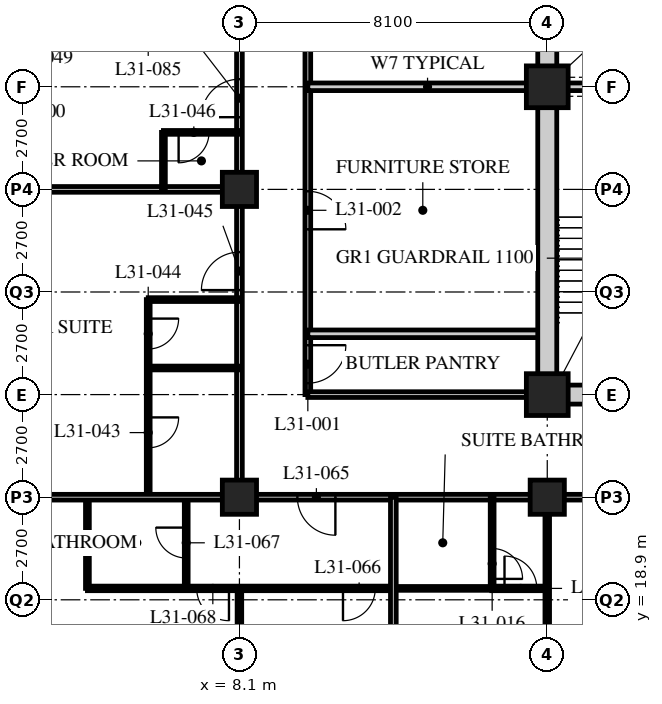
"""IFC4 building model, lengths in metres.
Left out: names, types, materials, properties, quantities, classifications, styles, units other than length and angle.
Written with IfcOpenShell. Run it as: python <this file> out.ifc"""

import sys

from ifc_helpers import new_model, si_unit, direction, frame, frame_2d, origin, origin_2d, place, context, subcontext, project, spatial, rectangle, hollow_rectangle, extrude, element, fill, save


model = new_model("IFC4")
c1 = context("Model", 3, precision=1e-05, world=origin(), true_north=direction((0.0, 1.0)))
c2 = subcontext(c1, "Body", "Model", "MODEL_VIEW")
j1 = project(units=[si_unit("LENGTHUNIT", "METRE"), si_unit("PLANEANGLEUNIT", "RADIAN")], contexts=[c1])
p1 = place(None, origin())
s1 = spatial("IfcSite", under=j1, at=p1, CompositionType="ELEMENT")
p2 = place(p1, origin())
s2 = spatial("IfcBuilding", under=s1, at=p2, CompositionType="ELEMENT")
p3 = place(p2, frame((0.0, 0.0, 123.8)))
s3 = spatial("IfcBuildingStorey", under=s2, at=p3, CompositionType="ELEMENT", Elevation=123.8)
for number, where, z_axis, x_axis in (
    (1, (8.1, 21.6, 0.0), (0.0, 0.0, 1.0), (1.0, 0.0, 0.0)),
    (2, (8.1, 29.7, 0.0), (0.0, 0.0, 1.0), (1.0, 0.0, 0.0)),
    (3, (16.2, 21.6, 0.0), (0.0, 0.0, 1.0), (1.0, 0.0, 0.0)),
):
    element("IfcColumn", number, at=place(p3, frame(where, z_axis=z_axis, x_axis=x_axis)), inside=s3, PredefinedType="COLUMN", context=c2, shape_type="SweptSolid", body=[
        extrude(hollow_rectangle(XDim=0.9, YDim=0.9, WallThickness=0.09, at=origin_2d()), origin(), (0.0, 0.0, 1.0), 3.4),
    ])
for number, where, z_axis, x_axis in (
    (4, (16.2, 24.3, 0.0), (0.0, 0.0, 1.0), (1.0, 0.0, 0.0)),
    (5, (16.2, 32.4, 0.0), (0.0, 0.0, 1.0), (1.0, 0.0, 0.0)),
):
    element("IfcColumn", number, at=place(p3, frame(where, z_axis=z_axis, x_axis=x_axis)), inside=s3, PredefinedType="COLUMN", context=c2, shape_type="SweptSolid", body=[
        extrude(hollow_rectangle(XDim=1.1, YDim=1.1, WallThickness=0.1, at=origin_2d()), origin(), (0.0, 0.0, 1.0), 3.4),
    ])
p4 = place(p3, frame((8.1, 21.6, 0.0), z_axis=(0.0, 0.0, 1.0), x_axis=(1.0, 0.0, 0.0)))
e6 = element("IfcWall", 6, at=p4, inside=s3, PredefinedType="PARTITIONING", context=c2, shape_type="SweptSolid", body=[
    extrude(rectangle(XDim=40.5, YDim=0.15, at=frame_2d((20.25, 0.0))), origin(), (0.0, 0.0, 1.0), 2.578),
])
p5 = place(p4, frame((9.625, 0.0, 0.0)))
e7 = element("IfcOpeningElement", 7, at=p5, cuts=e6, PredefinedType="OPENING", context=c2, shape_type="SweptSolid", body=[
    extrude(rectangle(XDim=1.0, YDim=2.1, at=frame_2d((0.5, 1.05))), frame((0.0, 0.085, 0.0), z_axis=(0.0, -1.0, 0.0), x_axis=(1.0, 0.0, 0.0)), (0.0, 0.0, 1.0), 0.17),
])
p6 = place(p4, frame((21.775, 0.0, 0.0)))
e8 = element("IfcOpeningElement", 8, at=p6, cuts=e6, PredefinedType="OPENING", context=c2, shape_type="SweptSolid", body=[
    extrude(rectangle(XDim=1.0, YDim=2.1, at=frame_2d((0.5, 1.05))), frame((0.0, 0.085, 0.0), z_axis=(0.0, -1.0, 0.0), x_axis=(1.0, 0.0, 0.0)), (0.0, 0.0, 1.0), 0.17),
])
p7 = place(p4, frame((28.95, 0.0, 0.0)))
e9 = element("IfcOpeningElement", 9, at=p7, cuts=e6, PredefinedType="OPENING", context=c2, shape_type="SweptSolid", body=[
    extrude(rectangle(XDim=1.0, YDim=2.1, at=frame_2d((0.5, 1.05))), frame((0.0, 0.085, 0.0), z_axis=(0.0, -1.0, 0.0), x_axis=(1.0, 0.0, 0.0)), (0.0, 0.0, 1.0), 0.17),
])
p8 = place(p4, frame((34.85, 0.0, 0.0)))
e10 = element("IfcOpeningElement", 10, at=p8, cuts=e6, PredefinedType="OPENING", context=c2, shape_type="SweptSolid", body=[
    extrude(rectangle(XDim=1.0, YDim=2.1, at=frame_2d((0.5, 1.05))), frame((0.0, 0.085, 0.0), z_axis=(0.0, -1.0, 0.0), x_axis=(1.0, 0.0, 0.0)), (0.0, 0.0, 1.0), 0.17),
])
p9 = place(p4, frame((1.525, 0.0, 0.0)))
e11 = element("IfcOpeningElement", 11, at=p9, cuts=e6, PredefinedType="OPENING", context=c2, shape_type="SweptSolid", body=[
    extrude(rectangle(XDim=1.0, YDim=2.1, at=frame_2d((0.5, 1.05))), frame((0.0, 0.085, 0.0), z_axis=(0.0, -1.0, 0.0), x_axis=(1.0, 0.0, 0.0)), (0.0, 0.0, 1.0), 0.17),
])
p10 = place(p4, frame((37.975, 0.0, 0.0)))
e12 = element("IfcOpeningElement", 12, at=p10, cuts=e6, PredefinedType="OPENING", context=c2, shape_type="SweptSolid", body=[
    extrude(rectangle(XDim=1.0, YDim=2.1, at=frame_2d((0.5, 1.05))), frame((0.0, 0.085, 0.0), z_axis=(0.0, -1.0, 0.0), x_axis=(1.0, 0.0, 0.0)), (0.0, 0.0, 1.0), 0.17),
])
p11 = place(p3, frame((8.1, 21.6, 0.0), z_axis=(0.0, 0.0, 1.0), x_axis=(0.0, 1.0, 0.0)))
e13 = element("IfcWall", 13, at=p11, inside=s3, PredefinedType="PARTITIONING", context=c2, shape_type="SweptSolid", body=[
    extrude(rectangle(XDim=24.3, YDim=0.15, at=frame_2d((12.15, 0.0))), origin(), (0.0, 0.0, 1.0), 2.578),
])
p12 = place(p11, frame((5.45, 0.0, 0.0)))
e14 = element("IfcOpeningElement", 14, at=p12, cuts=e13, PredefinedType="OPENING", context=c2, shape_type="SweptSolid", body=[
    extrude(rectangle(XDim=1.0, YDim=2.1, at=frame_2d((0.5, 1.05))), frame((0.0, 0.085, 0.0), z_axis=(0.0, -1.0, 0.0), x_axis=(1.0, 0.0, 0.0)), (0.0, 0.0, 1.0), 0.17),
])
p13 = place(p11, frame((10.0, 0.0, 0.0)))
e15 = element("IfcOpeningElement", 15, at=p13, cuts=e13, PredefinedType="OPENING", context=c2, shape_type="SweptSolid", body=[
    extrude(rectangle(XDim=1.0, YDim=2.1, at=frame_2d((0.5, 1.05))), frame((0.0, 0.085, 0.0), z_axis=(0.0, -1.0, 0.0), x_axis=(1.0, 0.0, 0.0)), (0.0, 0.0, 1.0), 0.17),
])
p14 = place(p11, frame((21.65, 0.0, 0.0)))
e16 = element("IfcOpeningElement", 16, at=p14, cuts=e13, PredefinedType="OPENING", context=c2, shape_type="SweptSolid", body=[
    extrude(rectangle(XDim=1.0, YDim=2.1, at=frame_2d((0.5, 1.05))), frame((0.0, 0.085, 0.0), z_axis=(0.0, -1.0, 0.0), x_axis=(1.0, 0.0, 0.0)), (0.0, 0.0, 1.0), 0.17),
])
p15 = place(p3, frame((9.9, 44.1, 0.0), z_axis=(0.0, 0.0, 1.0), x_axis=(0.0, -1.0, 0.0)))
e17 = element("IfcWall", 17, at=p15, inside=s3, PredefinedType="PARTITIONING", context=c2, shape_type="SweptSolid", body=[
    extrude(rectangle(XDim=19.8, YDim=0.15, at=frame_2d((9.9, 0.0))), origin(), (0.0, 0.0, 1.0), 3.19),
])
p16 = place(p15, frame((18.5, 0.0, 0.0)))
e18 = element("IfcOpeningElement", 18, at=p16, cuts=e17, PredefinedType="OPENING", context=c2, shape_type="SweptSolid", body=[
    extrude(rectangle(XDim=1.0, YDim=2.1, at=frame_2d((0.5, 1.05))), frame((0.0, 0.085, 0.0), z_axis=(0.0, -1.0, 0.0), x_axis=(1.0, 0.0, 0.0)), (0.0, 0.0, 1.0), 0.17),
])
p17 = place(p15, frame((14.45, 0.0, 0.0)))
e19 = element("IfcOpeningElement", 19, at=p17, cuts=e17, PredefinedType="OPENING", context=c2, shape_type="SweptSolid", body=[
    extrude(rectangle(XDim=1.0, YDim=2.1, at=frame_2d((0.5, 1.05))), frame((0.0, 0.085, 0.0), z_axis=(0.0, -1.0, 0.0), x_axis=(1.0, 0.0, 0.0)), (0.0, 0.0, 1.0), 0.17),
])
p18 = place(p15, frame((7.15, 0.0, 0.0)))
e20 = element("IfcOpeningElement", 20, at=p18, cuts=e17, PredefinedType="OPENING", context=c2, shape_type="SweptSolid", body=[
    extrude(rectangle(XDim=1.0, YDim=2.1, at=frame_2d((0.5, 1.05))), frame((0.0, 0.085, 0.0), z_axis=(0.0, -1.0, 0.0), x_axis=(1.0, 0.0, 0.0)), (0.0, 0.0, 1.0), 0.17),
])
p19 = place(p3, frame((9.9, 24.3, 0.0), z_axis=(0.0, 0.0, 1.0), x_axis=(1.0, 0.0, 0.0)))
e21 = element("IfcWall", 21, at=p19, inside=s3, PredefinedType="PARTITIONING", context=c2, shape_type="SweptSolid", body=[
    extrude(rectangle(XDim=6.1, YDim=0.15, at=frame_2d((3.05, 0.0))), origin(), (0.0, 0.0, 1.0), 3.19),
])
for number, where, z_axis, x_axis in (
    (22, (9.9, 32.4, 0.0), (0.0, 0.0, 1.0), (1.0, 0.0, 0.0)),
    (23, (9.9, 25.9, 0.0), (0.0, 0.0, 1.0), (1.0, 0.0, 0.0)),
):
    element("IfcWall", number, at=place(p3, frame(where, z_axis=z_axis, x_axis=x_axis)), inside=s3, PredefinedType="SOLIDWALL", context=c2, shape_type="SweptSolid", body=[
        extrude(rectangle(XDim=6.3, YDim=0.2, at=frame_2d((3.15, 0.0))), origin(), (0.0, 0.0, 1.0), 3.19),
    ])
p20 = place(p3, frame((12.15, 19.2, 0.0), z_axis=(0.0, 0.0, 1.0), x_axis=(1.0, 0.0, 0.0)))
e24 = element("IfcWall", 24, at=p20, inside=s3, PredefinedType="PARTITIONING", context=c2, shape_type="SweptSolid", body=[
    extrude(rectangle(XDim=2.6, YDim=0.1, at=frame_2d((1.3, 0.0))), origin(), (0.0, 0.0, 1.0), 3.19),
])
p21 = place(p3, frame((14.75, 21.6, 0.0), z_axis=(0.0, 0.0, 1.0), x_axis=(0.0, -1.0, 0.0)))
e25 = element("IfcWall", 25, at=p21, inside=s3, PredefinedType="PARTITIONING", context=c2, shape_type="SweptSolid", body=[
    extrude(rectangle(XDim=2.4, YDim=0.1, at=frame_2d((1.2, 0.0))), origin(), (0.0, 0.0, 1.0), 3.19),
])
p22 = place(p21, frame((1.35, 0.0, 0.0)))
e26 = element("IfcOpeningElement", 26, at=p22, cuts=e25, PredefinedType="OPENING", context=c2, shape_type="SweptSolid", body=[
    extrude(rectangle(XDim=0.8, YDim=2.1, at=frame_2d((0.4, 1.05))), frame((0.0, 0.06, 0.0), z_axis=(0.0, -1.0, 0.0), x_axis=(1.0, 0.0, 0.0)), (0.0, 0.0, 1.0), 0.12),
])
p23 = place(p3, frame((16.2, 21.6, 0.0), z_axis=(0.0, 0.0, 1.0), x_axis=(0.0, -1.0, 0.0)))
e27 = element("IfcWall", 27, at=p23, inside=s3, PredefinedType="PARTITIONING", context=c2, shape_type="SweptSolid", body=[
    extrude(rectangle(XDim=15.9, YDim=0.12, at=frame_2d((7.95, 0.0))), origin(), (0.0, 0.0, 1.0), 2.578),
])
p24 = place(p23, frame((8.875, 0.0, 0.0)))
e28 = element("IfcOpeningElement", 28, at=p24, cuts=e27, PredefinedType="OPENING", context=c2, shape_type="SweptSolid", body=[
    extrude(rectangle(XDim=0.85, YDim=2.1, at=frame_2d((0.425, 1.05))), frame((0.0, 0.07, 0.0), z_axis=(0.0, -1.0, 0.0), x_axis=(1.0, 0.0, 0.0)), (0.0, 0.0, 1.0), 0.14),
])
p25 = place(p3, frame((5.7, 21.6, 0.0), z_axis=(0.0, 0.0, 1.0), x_axis=(0.0, 1.0, 0.0)))
e29 = element("IfcWall", 29, at=p25, inside=s3, PredefinedType="PARTITIONING", context=c2, shape_type="SweptSolid", body=[
    extrude(rectangle(XDim=5.2, YDim=0.1, at=frame_2d((2.6, 0.0))), origin(), (0.0, 0.0, 1.0), 3.19),
])
p26 = place(p25, frame((1.3, 0.0, 0.0)))
e30 = element("IfcOpeningElement", 30, at=p26, cuts=e29, PredefinedType="OPENING", context=c2, shape_type="SweptSolid", body=[
    extrude(rectangle(XDim=0.8, YDim=2.1, at=frame_2d((0.4, 1.05))), frame((0.0, 0.06, 0.0), z_axis=(0.0, -1.0, 0.0), x_axis=(1.0, 0.0, 0.0)), (0.0, 0.0, 1.0), 0.12),
])
p27 = place(p25, frame((3.9, 0.0, 0.0)))
e31 = element("IfcOpeningElement", 31, at=p27, cuts=e29, PredefinedType="OPENING", context=c2, shape_type="SweptSolid", body=[
    extrude(rectangle(XDim=0.8, YDim=2.1, at=frame_2d((0.4, 1.05))), frame((0.0, 0.06, 0.0), z_axis=(0.0, -1.0, 0.0), x_axis=(1.0, 0.0, 0.0)), (0.0, 0.0, 1.0), 0.12),
])
for number, where, z_axis, x_axis in (
    (32, (8.1, 25.0, 0.0), (0.0, 0.0, 1.0), (-1.0, 0.0, 0.0)),
    (33, (8.1, 26.8, 0.0), (0.0, 0.0, 1.0), (-1.0, 0.0, 0.0)),
):
    element("IfcWall", number, at=place(p3, frame(where, z_axis=z_axis, x_axis=x_axis)), inside=s3, PredefinedType="PARTITIONING", context=c2, shape_type="SweptSolid", body=[
        extrude(rectangle(XDim=2.4, YDim=0.1, at=frame_2d((1.2, 0.0))), origin(), (0.0, 0.0, 1.0), 3.19),
    ])
p28 = place(p3, frame((8.1, 29.7, 0.0), z_axis=(0.0, 0.0, 1.0), x_axis=(-1.0, 0.0, 0.0)))
e34 = element("IfcWall", 34, at=p28, inside=s3, PredefinedType="PARTITIONING", context=c2, shape_type="SweptSolid", body=[
    extrude(rectangle(XDim=7.8, YDim=0.15, at=frame_2d((3.9, 0.0))), origin(), (0.0, 0.0, 1.0), 2.578),
])
p29 = place(p3, frame((6.1, 29.7, 0.0), z_axis=(0.0, 0.0, 1.0), x_axis=(0.0, 1.0, 0.0)))
e35 = element("IfcWall", 35, at=p29, inside=s3, PredefinedType="PARTITIONING", context=c2, shape_type="SweptSolid", body=[
    extrude(rectangle(XDim=1.5, YDim=0.1, at=frame_2d((0.75, 0.0))), origin(), (0.0, 0.0, 1.0), 3.19),
])
p30 = place(p3, frame((8.1, 31.2, 0.0), z_axis=(0.0, 0.0, 1.0), x_axis=(-1.0, 0.0, 0.0)))
e36 = element("IfcWall", 36, at=p30, inside=s3, PredefinedType="PARTITIONING", context=c2, shape_type="SweptSolid", body=[
    extrude(rectangle(XDim=2.0, YDim=0.1, at=frame_2d((1.0, 0.0))), origin(), (0.0, 0.0, 1.0), 3.19),
])
p31 = place(p30, frame((0.8, 0.0, 0.0)))
e37 = element("IfcOpeningElement", 37, at=p31, cuts=e36, PredefinedType="OPENING", context=c2, shape_type="SweptSolid", body=[
    extrude(rectangle(XDim=0.8, YDim=2.1, at=frame_2d((0.4, 1.05))), frame((0.0, 0.06, 0.0), z_axis=(0.0, -1.0, 0.0), x_axis=(1.0, 0.0, 0.0)), (0.0, 0.0, 1.0), 0.12),
])
p32 = place(p3, frame((6.7, 21.6, 0.0), z_axis=(0.0, 0.0, 1.0), x_axis=(0.0, -1.0, 0.0)))
e38 = element("IfcWall", 38, at=p32, inside=s3, PredefinedType="PARTITIONING", context=c2, shape_type="SweptSolid", body=[
    extrude(rectangle(XDim=2.4, YDim=0.1, at=frame_2d((1.2, 0.0))), origin(), (0.0, 0.0, 1.0), 3.19),
])
p33 = place(p32, frame((0.8, 0.0, 0.0)))
e39 = element("IfcOpeningElement", 39, at=p33, cuts=e38, PredefinedType="OPENING", context=c2, shape_type="SweptSolid", body=[
    extrude(rectangle(XDim=0.8, YDim=2.1, at=frame_2d((0.4, 1.05))), frame((0.0, 0.06, 0.0), z_axis=(0.0, -1.0, 0.0), x_axis=(1.0, 0.0, 0.0)), (0.0, 0.0, 1.0), 0.12),
])
p34 = place(p3, frame((4.1, 21.6, 0.0), z_axis=(0.0, 0.0, 1.0), x_axis=(0.0, -1.0, 0.0)))
e40 = element("IfcWall", 40, at=p34, inside=s3, PredefinedType="PARTITIONING", context=c2, shape_type="SweptSolid", body=[
    extrude(rectangle(XDim=2.4, YDim=0.1, at=frame_2d((1.2, 0.0))), origin(), (0.0, 0.0, 1.0), 3.19),
])
p35 = place(p3, frame((4.1, 19.2, 0.0), z_axis=(0.0, 0.0, 1.0), x_axis=(1.0, 0.0, 0.0)))
e41 = element("IfcWall", 41, at=p35, inside=s3, PredefinedType="PARTITIONING", context=c2, shape_type="SweptSolid", body=[
    extrude(rectangle(XDim=8.05, YDim=0.12, at=frame_2d((4.025, 0.0))), origin(), (0.0, 0.0, 1.0), 3.19),
])
p36 = place(p35, frame((6.725, 0.0, 0.0)))
e42 = element("IfcOpeningElement", 42, at=p36, cuts=e41, PredefinedType="OPENING", context=c2, shape_type="SweptSolid", body=[
    extrude(rectangle(XDim=0.85, YDim=2.1, at=frame_2d((0.425, 1.05))), frame((0.0, 0.07, 0.0), z_axis=(0.0, -1.0, 0.0), x_axis=(1.0, 0.0, 0.0)), (0.0, 0.0, 1.0), 0.14),
])
p37 = place(p35, frame((2.875, 0.0, 0.0)))
e43 = element("IfcOpeningElement", 43, at=p37, cuts=e41, PredefinedType="OPENING", context=c2, shape_type="SweptSolid", body=[
    extrude(rectangle(XDim=0.85, YDim=2.1, at=frame_2d((0.425, 1.05))), frame((0.0, 0.07, 0.0), z_axis=(0.0, -1.0, 0.0), x_axis=(1.0, 0.0, 0.0)), (0.0, 0.0, 1.0), 0.14),
])
p38 = place(p3, frame((8.1, 19.2, 0.0), z_axis=(0.0, 0.0, 1.0), x_axis=(0.0, -1.0, 0.0)))
e44 = element("IfcWall", 44, at=p38, inside=s3, PredefinedType="PARTITIONING", context=c2, shape_type="SweptSolid", body=[
    extrude(rectangle(XDim=9.45, YDim=0.12, at=frame_2d((4.725, 0.0))), origin(), (0.0, 0.0, 1.0), 2.578),
])
p39 = place(p3, frame((0.3, 21.6, 0.0), z_axis=(0.0, 0.0, 1.0), x_axis=(1.0, 0.0, 0.0)))
e45 = element("IfcWall", 45, at=p39, inside=s3, PredefinedType="PARTITIONING", context=c2, shape_type="SweptSolid", body=[
    extrude(rectangle(XDim=7.8, YDim=0.15, at=frame_2d((3.9, 0.0))), origin(), (0.0, 0.0, 1.0), 2.578),
])
p40 = place(p3, frame((12.15, 21.6, 0.0), z_axis=(0.0, 0.0, 1.0), x_axis=(0.0, -1.0, 0.0)))
e46 = element("IfcWall", 46, at=p40, inside=s3, PredefinedType="PARTITIONING", context=c2, shape_type="SweptSolid", body=[
    extrude(rectangle(XDim=15.9, YDim=0.15, at=frame_2d((7.95, 0.0))), origin(), (0.0, 0.0, 1.0), 3.19),
])
p41 = place(p3, frame((16.2, 19.2, 0.0), z_axis=(0.0, 0.0, 1.0), x_axis=(-1.0, 0.0, 0.0)))
e47 = element("IfcWall", 47, at=p41, inside=s3, PredefinedType="PARTITIONING", context=c2, shape_type="SweptSolid", body=[
    extrude(rectangle(XDim=1.46, YDim=0.12, at=frame_2d((0.73, 0.0))), origin(), (0.0, 0.0, 1.0), 3.19),
])
p42 = place(p41, frame((0.275, 0.0, 0.0)))
e48 = element("IfcOpeningElement", 48, at=p42, cuts=e47, PredefinedType="OPENING", context=c2, shape_type="SweptSolid", body=[
    extrude(rectangle(XDim=0.85, YDim=2.1, at=frame_2d((0.425, 1.05))), frame((0.0, 0.07, 0.0), z_axis=(0.0, -1.0, 0.0), x_axis=(1.0, 0.0, 0.0)), (0.0, 0.0, 1.0), 0.14),
])
p43 = place(p3, frame((15.95, 24.3, 0.0), z_axis=(0.0, 0.0, 1.0), x_axis=(1.0, 0.0, 0.0)))
e49 = element("IfcWall", 49, at=p43, inside=s3, PredefinedType="SOLIDWALL", context=c2, shape_type="SweptSolid", body=[
    extrude(rectangle(XDim=24.8, YDim=0.5, at=frame_2d((12.4, 0.0))), origin(), (0.0, 0.0, 1.0), 2.54),
])
p44 = place(p43, frame((11.5, 0.0, 0.0)))
e50 = element("IfcOpeningElement", 50, at=p44, cuts=e49, PredefinedType="OPENING", context=c2, shape_type="SweptSolid", body=[
    extrude(rectangle(XDim=1.8, YDim=2.4, at=frame_2d((0.9, 1.2))), frame((0.0, 0.26, 0.0), z_axis=(0.0, -1.0, 0.0), x_axis=(1.0, 0.0, 0.0)), (0.0, 0.0, 1.0), 0.52),
])
p45 = place(p3, frame((16.2, 24.55, 0.0), z_axis=(0.0, 0.0, 1.0), x_axis=(0.0, 1.0, 0.0)))
e51 = element("IfcWall", 51, at=p45, inside=s3, PredefinedType="SOLIDWALL", context=c2, shape_type="SweptSolid", body=[
    extrude(rectangle(XDim=15.7, YDim=0.5, at=frame_2d((7.85, 0.0))), origin(), (0.0, 0.0, 1.0), 2.578),
])
p46 = place(p3, frame((16.45, 32.4, 0.0), z_axis=(0.0, 0.0, 1.0), x_axis=(1.0, 0.0, 0.0)))
e52 = element("IfcWall", 52, at=p46, inside=s3, PredefinedType="SOLIDWALL", context=c2, shape_type="SweptSolid", body=[
    extrude(rectangle(XDim=7.95, YDim=0.2, at=frame_2d((3.975, 0.0))), origin(), (0.0, 0.0, 1.0), 2.578),
])
p47 = place(p16, origin())
e53 = element("IfcDoor", 53, at=p47, inside=s3, OperationType="SINGLE_SWING_LEFT", PredefinedType="DOOR", context=c2, shape_type="SweptSolid", body=[
    extrude(rectangle(XDim=1.0, YDim=2.1, at=frame_2d((0.5, 1.05))), frame((0.0, 0.025, 0.0), z_axis=(0.0, -1.0, 0.0), x_axis=(1.0, 0.0, 0.0)), (0.0, 0.0, 1.0), 0.05),
])
fill(e18, e53)
p48 = place(p17, origin())
e54 = element("IfcDoor", 54, at=p48, inside=s3, OperationType="SINGLE_SWING_RIGHT", PredefinedType="DOOR", context=c2, shape_type="SweptSolid", body=[
    extrude(rectangle(XDim=1.0, YDim=2.1, at=frame_2d((0.5, 1.05))), frame((0.0, 0.025, 0.0), z_axis=(0.0, -1.0, 0.0), x_axis=(1.0, 0.0, 0.0)), (0.0, 0.0, 1.0), 0.05),
])
fill(e19, e54)
p49 = place(p22, origin())
e55 = element("IfcDoor", 55, at=p49, inside=s3, OperationType="SINGLE_SWING_RIGHT", PredefinedType="DOOR", context=c2, shape_type="SweptSolid", body=[
    extrude(rectangle(XDim=0.8, YDim=2.1, at=frame_2d((0.4, 1.05))), frame((0.0, 0.025, 0.0), z_axis=(0.0, -1.0, 0.0), x_axis=(1.0, 0.0, 0.0)), (0.0, 0.0, 1.0), 0.05),
])
fill(e26, e55)
p50 = place(p26, origin())
e56 = element("IfcDoor", 56, at=p50, inside=s3, OperationType="SINGLE_SWING_LEFT", PredefinedType="DOOR", context=c2, shape_type="SweptSolid", body=[
    extrude(rectangle(XDim=0.8, YDim=2.1, at=frame_2d((0.4, 1.05))), frame((0.0, 0.025, 0.0), z_axis=(0.0, -1.0, 0.0), x_axis=(1.0, 0.0, 0.0)), (0.0, 0.0, 1.0), 0.05),
])
fill(e30, e56)
p51 = place(p27, origin())
e57 = element("IfcDoor", 57, at=p51, inside=s3, OperationType="SINGLE_SWING_LEFT", PredefinedType="DOOR", context=c2, shape_type="SweptSolid", body=[
    extrude(rectangle(XDim=0.8, YDim=2.1, at=frame_2d((0.4, 1.05))), frame((0.0, 0.025, 0.0), z_axis=(0.0, -1.0, 0.0), x_axis=(1.0, 0.0, 0.0)), (0.0, 0.0, 1.0), 0.05),
])
fill(e31, e57)
p52 = place(p12, origin())
e58 = element("IfcDoor", 58, at=p52, inside=s3, OperationType="SINGLE_SWING_LEFT", PredefinedType="DOOR", context=c2, shape_type="SweptSolid", body=[
    extrude(rectangle(XDim=1.0, YDim=2.1, at=frame_2d((0.5, 1.05))), frame((0.0, 0.025, 0.0), z_axis=(0.0, -1.0, 0.0), x_axis=(1.0, 0.0, 0.0)), (0.0, 0.0, 1.0), 0.05),
])
fill(e14, e58)
p53 = place(p31, origin())
e59 = element("IfcDoor", 59, at=p53, inside=s3, OperationType="SINGLE_SWING_RIGHT", PredefinedType="DOOR", context=c2, shape_type="SweptSolid", body=[
    extrude(rectangle(XDim=0.8, YDim=2.1, at=frame_2d((0.4, 1.05))), frame((0.0, 0.025, 0.0), z_axis=(0.0, -1.0, 0.0), x_axis=(1.0, 0.0, 0.0)), (0.0, 0.0, 1.0), 0.05),
])
fill(e37, e59)
p54 = place(p13, origin())
e60 = element("IfcDoor", 60, at=p54, inside=s3, OperationType="SINGLE_SWING_LEFT", PredefinedType="DOOR", context=c2, shape_type="SweptSolid", body=[
    extrude(rectangle(XDim=1.0, YDim=2.1, at=frame_2d((0.5, 1.05))), frame((0.0, 0.025, 0.0), z_axis=(0.0, -1.0, 0.0), x_axis=(1.0, 0.0, 0.0)), (0.0, 0.0, 1.0), 0.05),
])
fill(e15, e60)
p55 = place(p9, origin())
e61 = element("IfcDoor", 61, at=p55, inside=s3, OperationType="SINGLE_SWING_LEFT", PredefinedType="DOOR", context=c2, shape_type="SweptSolid", body=[
    extrude(rectangle(XDim=1.0, YDim=2.1, at=frame_2d((0.5, 1.05))), frame((0.0, 0.025, 0.0), z_axis=(0.0, -1.0, 0.0), x_axis=(1.0, 0.0, 0.0)), (0.0, 0.0, 1.0), 0.05),
])
fill(e11, e61)
p56 = place(p36, origin())
e62 = element("IfcDoor", 62, at=p56, inside=s3, OperationType="SINGLE_SWING_RIGHT", PredefinedType="DOOR", context=c2, shape_type="SweptSolid", body=[
    extrude(rectangle(XDim=0.85, YDim=2.1, at=frame_2d((0.425, 1.05))), frame((0.0, 0.025, 0.0), z_axis=(0.0, -1.0, 0.0), x_axis=(1.0, 0.0, 0.0)), (0.0, 0.0, 1.0), 0.05),
])
fill(e42, e62)
p57 = place(p33, origin())
e63 = element("IfcDoor", 63, at=p57, inside=s3, OperationType="SINGLE_SWING_RIGHT", PredefinedType="DOOR", context=c2, shape_type="SweptSolid", body=[
    extrude(rectangle(XDim=0.8, YDim=2.1, at=frame_2d((0.4, 1.05))), frame((0.0, 0.025, 0.0), z_axis=(0.0, -1.0, 0.0), x_axis=(1.0, 0.0, 0.0)), (0.0, 0.0, 1.0), 0.05),
])
fill(e39, e63)
p58 = place(p37, origin())
e64 = element("IfcDoor", 64, at=p58, inside=s3, OperationType="SINGLE_SWING_LEFT", PredefinedType="DOOR", context=c2, shape_type="SweptSolid", body=[
    extrude(rectangle(XDim=0.85, YDim=2.1, at=frame_2d((0.425, 1.05))), frame((0.0, 0.025, 0.0), z_axis=(0.0, -1.0, 0.0), x_axis=(1.0, 0.0, 0.0)), (0.0, 0.0, 1.0), 0.05),
])
fill(e43, e64)
p59 = place(p42, origin())
e65 = element("IfcDoor", 65, at=p59, inside=s3, OperationType="SINGLE_SWING_LEFT", PredefinedType="DOOR", context=c2, shape_type="SweptSolid", body=[
    extrude(rectangle(XDim=0.85, YDim=2.1, at=frame_2d((0.425, 1.05))), frame((0.0, 0.025, 0.0), z_axis=(0.0, -1.0, 0.0), x_axis=(1.0, 0.0, 0.0)), (0.0, 0.0, 1.0), 0.05),
])
fill(e48, e65)
save(model, sys.argv[1])
